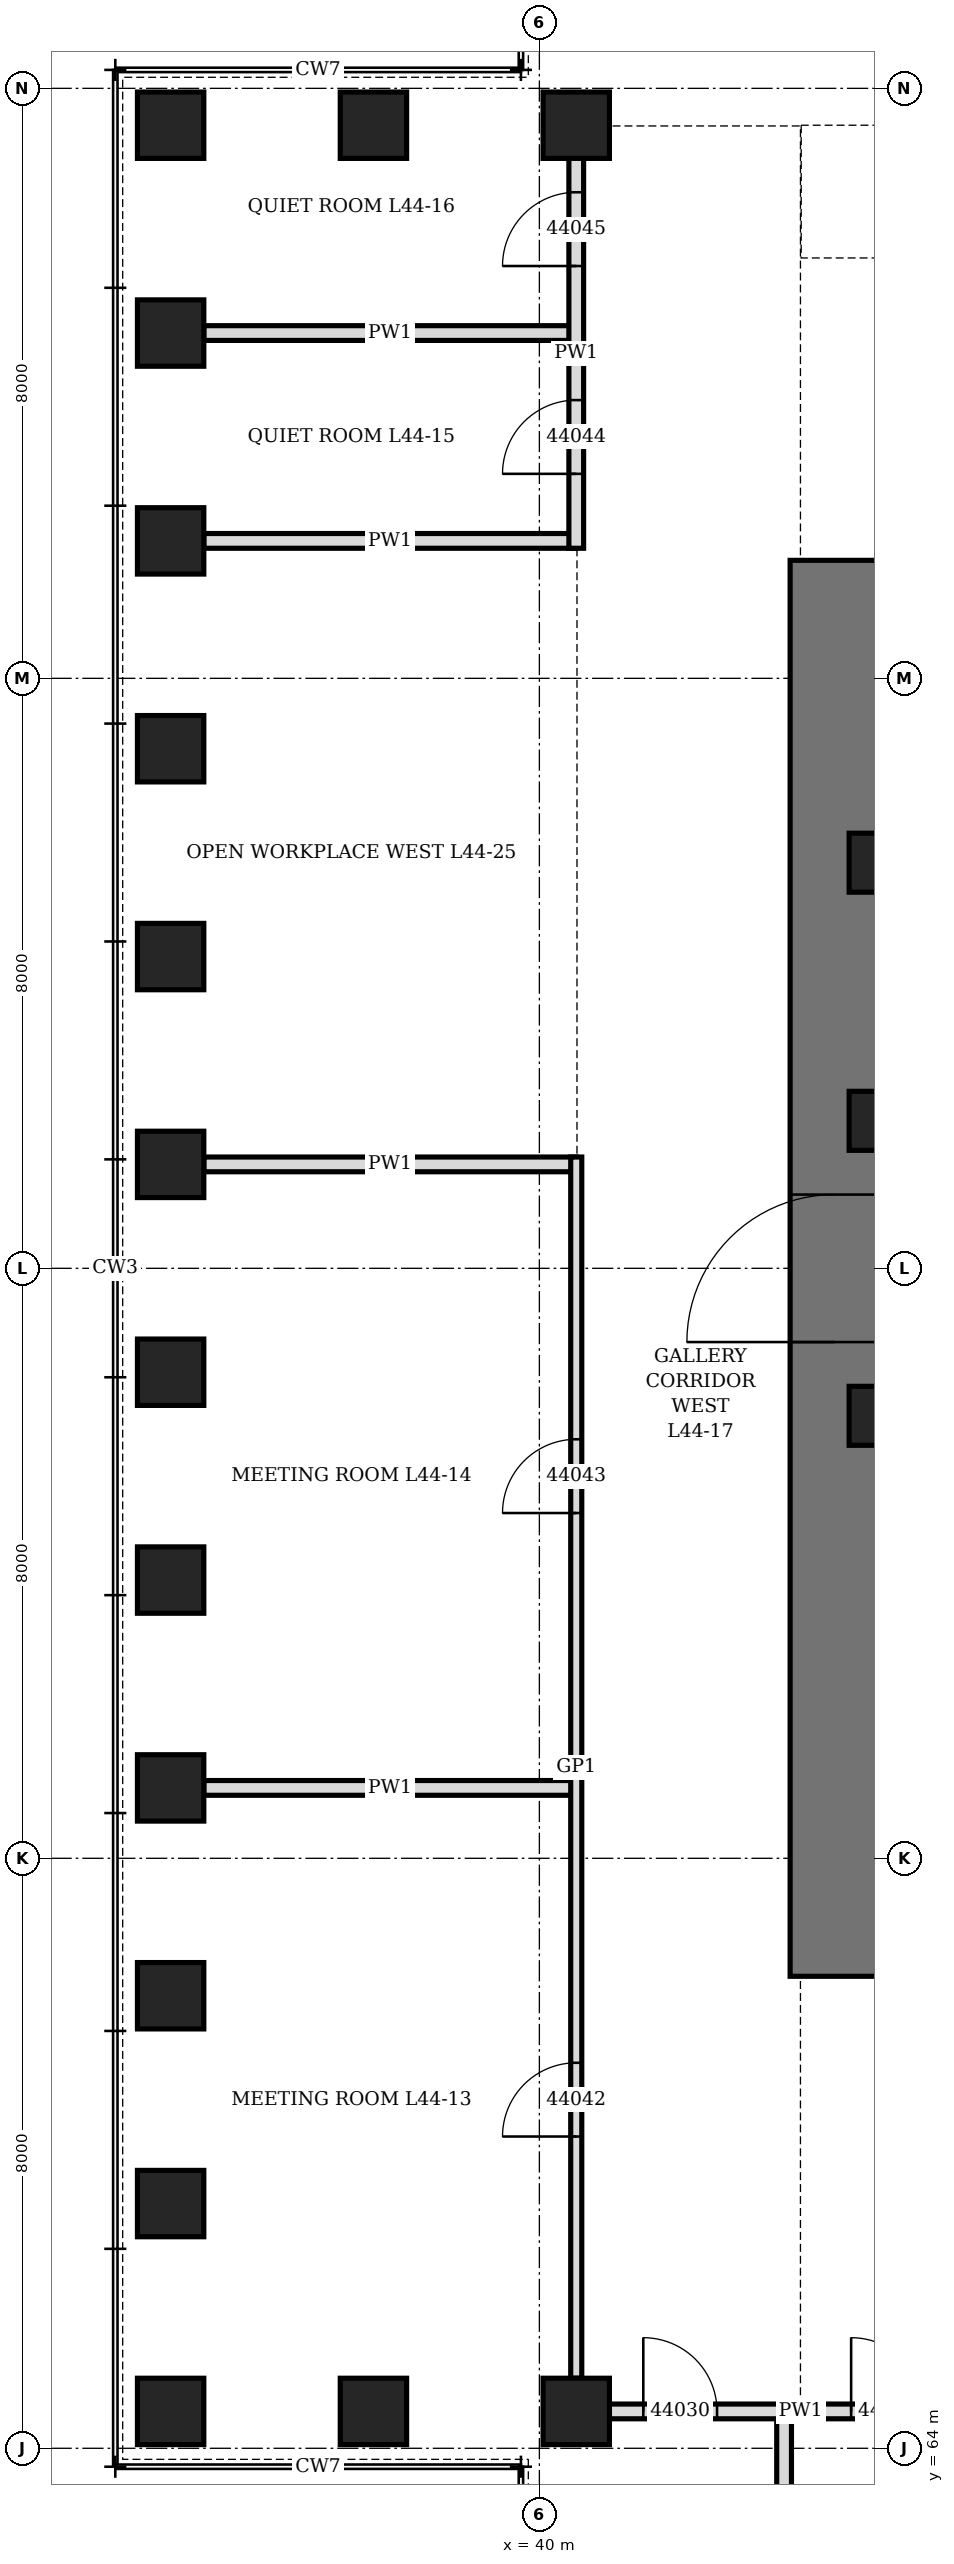
"""IFC4 building model, lengths in metres.
Left out: names, types, materials, properties, quantities, classifications, styles, units other than length and angle.
Written with IfcOpenShell. Run it as: python <this file> out.ifc"""

import sys

from ifc_helpers import new_model, si_unit, direction, frame, frame_2d, origin, origin_2d, place, context, subcontext, project, spatial, rectangle, hollow_rectangle, extrude, element, fill, save


model = new_model("IFC4")
c1 = context("Model", 3, precision=1e-05, world=origin(), true_north=direction((0.0, 1.0)))
c2 = subcontext(c1, "Body", "Model", "MODEL_VIEW")
j1 = project(units=[si_unit("LENGTHUNIT", "METRE"), si_unit("PLANEANGLEUNIT", "RADIAN")], contexts=[c1])
p1 = place(None, origin())
s1 = spatial("IfcSite", under=j1, at=p1, CompositionType="ELEMENT")
p2 = place(p1, origin())
s2 = spatial("IfcBuilding", under=s1, at=p2, CompositionType="ELEMENT")
p3 = place(p2, frame((0.0, 0.0, 198.1)))
s3 = spatial("IfcBuildingStorey", under=s2, at=p3, CompositionType="ELEMENT", Elevation=198.1)
for number, where, z_axis, x_axis in (
    (1, (40.5, 95.5, 0.0), (0.0, 0.0, 1.0), (1.0, 0.0, 0.0)),
    (2, (37.75, 95.5, 0.0), (0.0, 0.0, 1.0), (1.0, 0.0, 0.0)),
    (3, (35.0, 95.5, 0.0), (0.0, 0.0, 1.0), (0.0, 1.0, 0.0)),
    (4, (35.0, 92.682, 0.0), (0.0, 0.0, 1.0), (0.0, 1.0, 0.0)),
    (5, (35.0, 89.864, 0.0), (0.0, 0.0, 1.0), (0.0, 1.0, 0.0)),
    (6, (35.0, 87.045, 0.0), (0.0, 0.0, 1.0), (0.0, 1.0, 0.0)),
    (7, (35.0, 84.227, 0.0), (0.0, 0.0, 1.0), (0.0, 1.0, 0.0)),
    (8, (35.0, 81.409, 0.0), (0.0, 0.0, 1.0), (0.0, 1.0, 0.0)),
    (9, (35.0, 78.591, 0.0), (0.0, 0.0, 1.0), (0.0, 1.0, 0.0)),
    (10, (35.0, 75.773, 0.0), (0.0, 0.0, 1.0), (0.0, 1.0, 0.0)),
    (11, (35.0, 72.955, 0.0), (0.0, 0.0, 1.0), (0.0, 1.0, 0.0)),
    (12, (35.0, 70.136, 0.0), (0.0, 0.0, 1.0), (0.0, 1.0, 0.0)),
    (13, (35.0, 67.318, 0.0), (0.0, 0.0, 1.0), (0.0, 1.0, 0.0)),
    (14, (35.0, 64.5, 0.0), (0.0, 0.0, 1.0), (1.0, 0.0, 0.0)),
    (15, (37.75, 64.5, 0.0), (0.0, 0.0, 1.0), (1.0, 0.0, 0.0)),
    (16, (40.5, 64.5, 0.0), (0.0, 0.0, 1.0), (0.0, 1.0, 0.0)),
):
    element("IfcColumn", number, at=place(p3, frame(where, z_axis=z_axis, x_axis=x_axis)), inside=s3, PredefinedType="COLUMN", context=c2, shape_type="SweptSolid", body=[
        extrude(hollow_rectangle(XDim=0.9, YDim=0.9, WallThickness=0.12, at=origin_2d()), origin(), (0.0, 0.0, 1.0), 4.2),
    ])
p4 = place(p3, frame((44.0, 70.4, 0.0), z_axis=(0.0, 0.0, 1.0), x_axis=(0.0, 1.0, 0.0)))
e17 = element("IfcWall", 17, at=p4, inside=s3, PredefinedType="SHEAR", context=c2, shape_type="SweptSolid", body=[
    extrude(rectangle(XDim=19.2, YDim=1.2, at=frame_2d((9.6, 0.0))), origin(), (0.0, 0.0, 1.0), 4.2),
])
p5 = place(p4, frame((8.6, 0.0, 0.0)))
e18 = element("IfcOpeningElement", 18, at=p5, cuts=e17, PredefinedType="OPENING", context=c2, shape_type="SweptSolid", body=[
    extrude(rectangle(XDim=2.0, YDim=2.4, at=frame_2d((1.0, 1.2))), frame((0.0, 0.61, 0.0), z_axis=(0.0, -1.0, 0.0), x_axis=(1.0, 0.0, 0.0)), (0.0, 0.0, 1.0), 1.22),
])
for number, where, z_axis, x_axis in (
    (19, (44.6, 78.0, 0.0), (0.0, 0.0, 1.0), (1.0, 0.0, 0.0)),
    (20, (44.6, 82.0, 0.0), (0.0, 0.0, 1.0), (1.0, 0.0, 0.0)),
    (21, (44.6, 85.5, 0.0), (0.0, 0.0, 1.0), (1.0, 0.0, 0.0)),
):
    element("IfcColumn", number, at=place(p3, frame(where, z_axis=z_axis, x_axis=x_axis)), inside=s3, PredefinedType="COLUMN", context=c2, shape_type="SweptSolid", body=[
        extrude(hollow_rectangle(XDim=0.8, YDim=0.8, WallThickness=0.1, at=origin_2d()), origin(), (0.0, 0.0, 1.0), 4.2),
    ])
for number, where, z_axis, x_axis in (
    (22, (43.318, 59.45, 0.0), (0.0, 0.0, 1.0), (0.0, 1.0, 0.0)),
    (23, (35.45, 72.955, 0.0), (0.0, 0.0, 1.0), (1.0, 0.0, 0.0)),
    (24, (35.45, 81.409, 0.0), (0.0, 0.0, 1.0), (1.0, 0.0, 0.0)),
    (25, (35.45, 89.864, 0.0), (0.0, 0.0, 1.0), (1.0, 0.0, 0.0)),
    (26, (35.45, 92.682, 0.0), (0.0, 0.0, 1.0), (1.0, 0.0, 0.0)),
):
    element("IfcWall", number, at=place(p3, frame(where, z_axis=z_axis, x_axis=x_axis)), inside=s3, PredefinedType="PARTITIONING", context=c2, shape_type="SweptSolid", body=[
        extrude(rectangle(XDim=5.05, YDim=0.2, at=frame_2d((2.525, 0.0))), origin(), (0.0, 0.0, 1.0), 3.428),
    ])
p6 = place(p3, frame((40.95, 64.5, 0.0), z_axis=(0.0, 0.0, 1.0), x_axis=(1.0, 0.0, 0.0)))
e27 = element("IfcWall", 27, at=p6, inside=s3, PredefinedType="PARTITIONING", context=c2, shape_type="SweptSolid", body=[
    extrude(rectangle(XDim=5.187, YDim=0.2, at=frame_2d((2.593, 0.0))), origin(), (0.0, 0.0, 1.0), 4.04),
])
p7 = place(p6, frame((0.459, 0.0, 0.0)))
e28 = element("IfcOpeningElement", 28, at=p7, cuts=e27, PredefinedType="OPENING", context=c2, shape_type="SweptSolid", body=[
    extrude(rectangle(XDim=1.0, YDim=2.1, at=frame_2d((0.5, 1.05))), frame((0.0, 0.11, 0.0), z_axis=(0.0, -1.0, 0.0), x_axis=(1.0, 0.0, 0.0)), (0.0, 0.0, 1.0), 0.22),
])
p8 = place(p6, frame((3.277, 0.0, 0.0)))
e29 = element("IfcOpeningElement", 29, at=p8, cuts=e27, PredefinedType="OPENING", context=c2, shape_type="SweptSolid", body=[
    extrude(rectangle(XDim=1.0, YDim=2.1, at=frame_2d((0.5, 1.05))), frame((0.0, 0.11, 0.0), z_axis=(0.0, -1.0, 0.0), x_axis=(1.0, 0.0, 0.0)), (0.0, 0.0, 1.0), 0.22),
])
p9 = place(p3, frame((40.5, 64.95, 0.0), z_axis=(0.0, 0.0, 1.0), x_axis=(0.0, 1.0, 0.0)))
e30 = element("IfcWall", 30, at=p9, inside=s3, PredefinedType="PARTITIONING", context=c2, shape_type="SweptSolid", body=[
    extrude(rectangle(XDim=16.559, YDim=0.15, at=frame_2d((8.28, 0.0))), origin(), (0.0, 0.0, 1.0), 4.04),
])
p10 = place(p9, frame((3.277, 0.0, 0.0)))
e31 = element("IfcOpeningElement", 31, at=p10, cuts=e30, PredefinedType="OPENING", context=c2, shape_type="SweptSolid", body=[
    extrude(rectangle(XDim=1.0, YDim=2.4, at=frame_2d((0.5, 1.2))), frame((0.0, 0.085, 0.0), z_axis=(0.0, -1.0, 0.0), x_axis=(1.0, 0.0, 0.0)), (0.0, 0.0, 1.0), 0.17),
])
p11 = place(p9, frame((11.732, 0.0, 0.0)))
e32 = element("IfcOpeningElement", 32, at=p11, cuts=e30, PredefinedType="OPENING", context=c2, shape_type="SweptSolid", body=[
    extrude(rectangle(XDim=1.0, YDim=2.4, at=frame_2d((0.5, 1.2))), frame((0.0, 0.085, 0.0), z_axis=(0.0, -1.0, 0.0), x_axis=(1.0, 0.0, 0.0)), (0.0, 0.0, 1.0), 0.17),
])
p12 = place(p3, frame((40.5, 89.764, 0.0), z_axis=(0.0, 0.0, 1.0), x_axis=(0.0, 1.0, 0.0)))
e33 = element("IfcWall", 33, at=p12, inside=s3, PredefinedType="PARTITIONING", context=c2, shape_type="SweptSolid", body=[
    extrude(rectangle(XDim=5.286, YDim=0.2, at=frame_2d((2.643, 0.0))), origin(), (0.0, 0.0, 1.0), 4.04),
])
p13 = place(p12, frame((1.009, 0.0, 0.0)))
e34 = element("IfcOpeningElement", 34, at=p13, cuts=e33, PredefinedType="OPENING", context=c2, shape_type="SweptSolid", body=[
    extrude(rectangle(XDim=1.0, YDim=2.1, at=frame_2d((0.5, 1.05))), frame((0.0, 0.11, 0.0), z_axis=(0.0, -1.0, 0.0), x_axis=(1.0, 0.0, 0.0)), (0.0, 0.0, 1.0), 0.22),
])
p14 = place(p12, frame((3.827, 0.0, 0.0)))
e35 = element("IfcOpeningElement", 35, at=p14, cuts=e33, PredefinedType="OPENING", context=c2, shape_type="SweptSolid", body=[
    extrude(rectangle(XDim=1.0, YDim=2.1, at=frame_2d((0.5, 1.05))), frame((0.0, 0.11, 0.0), z_axis=(0.0, -1.0, 0.0), x_axis=(1.0, 0.0, 0.0)), (0.0, 0.0, 1.0), 0.22),
])
p15 = place(p5, origin())
e36 = element("IfcDoor", 36, at=p15, inside=s3, OperationType="DOUBLE_DOOR_SINGLE_SWING", PredefinedType="DOOR", context=c2, shape_type="SweptSolid", body=[
    extrude(rectangle(XDim=2.0, YDim=2.4, at=frame_2d((1.0, 1.2))), frame((0.0, 0.35, 0.0), z_axis=(0.0, -1.0, 0.0), x_axis=(1.0, 0.0, 0.0)), (0.0, 0.0, 1.0), 0.7),
])
fill(e18, e36)
p16 = place(p7, origin())
e37 = element("IfcDoor", 37, at=p16, inside=s3, OperationType="SINGLE_SWING_LEFT", PredefinedType="DOOR", context=c2, shape_type="SweptSolid", body=[
    extrude(rectangle(XDim=1.0, YDim=2.1, at=frame_2d((0.5, 1.05))), frame((0.0, 0.1, 0.0), z_axis=(0.0, -1.0, 0.0), x_axis=(1.0, 0.0, 0.0)), (0.0, 0.0, 1.0), 0.199),
])
fill(e28, e37)
p17 = place(p8, origin())
e38 = element("IfcDoor", 38, at=p17, inside=s3, OperationType="SINGLE_SWING_LEFT", PredefinedType="DOOR", context=c2, shape_type="SweptSolid", body=[
    extrude(rectangle(XDim=1.0, YDim=2.1, at=frame_2d((0.5, 1.05))), frame((0.0, 0.1, 0.0), z_axis=(0.0, -1.0, 0.0), x_axis=(1.0, 0.0, 0.0)), (0.0, 0.0, 1.0), 0.199),
])
fill(e29, e38)
p18 = place(p10, origin())
e39 = element("IfcDoor", 39, at=p18, inside=s3, OperationType="SINGLE_SWING_RIGHT", PredefinedType="DOOR", context=c2, shape_type="SweptSolid", body=[
    extrude(rectangle(XDim=1.0, YDim=2.4, at=frame_2d((0.5, 1.2))), frame((0.0, 0.075, 0.0), z_axis=(0.0, -1.0, 0.0), x_axis=(1.0, 0.0, 0.0)), (0.0, 0.0, 1.0), 0.149),
])
fill(e31, e39)
p19 = place(p11, origin())
e40 = element("IfcDoor", 40, at=p19, inside=s3, OperationType="SINGLE_SWING_RIGHT", PredefinedType="DOOR", context=c2, shape_type="SweptSolid", body=[
    extrude(rectangle(XDim=1.0, YDim=2.4, at=frame_2d((0.5, 1.2))), frame((0.0, 0.075, 0.0), z_axis=(0.0, -1.0, 0.0), x_axis=(1.0, 0.0, 0.0)), (0.0, 0.0, 1.0), 0.149),
])
fill(e32, e40)
p20 = place(p13, origin())
e41 = element("IfcDoor", 41, at=p20, inside=s3, OperationType="SINGLE_SWING_LEFT", PredefinedType="DOOR", context=c2, shape_type="SweptSolid", body=[
    extrude(rectangle(XDim=1.0, YDim=2.1, at=frame_2d((0.5, 1.05))), frame((0.0, 0.1, 0.0), z_axis=(0.0, -1.0, 0.0), x_axis=(1.0, 0.0, 0.0)), (0.0, 0.0, 1.0), 0.199),
])
fill(e34, e41)
p21 = place(p14, origin())
e42 = element("IfcDoor", 42, at=p21, inside=s3, OperationType="SINGLE_SWING_LEFT", PredefinedType="DOOR", context=c2, shape_type="SweptSolid", body=[
    extrude(rectangle(XDim=1.0, YDim=2.1, at=frame_2d((0.5, 1.05))), frame((0.0, 0.1, 0.0), z_axis=(0.0, -1.0, 0.0), x_axis=(1.0, 0.0, 0.0)), (0.0, 0.0, 1.0), 0.199),
])
fill(e35, e42)
save(model, sys.argv[1])
